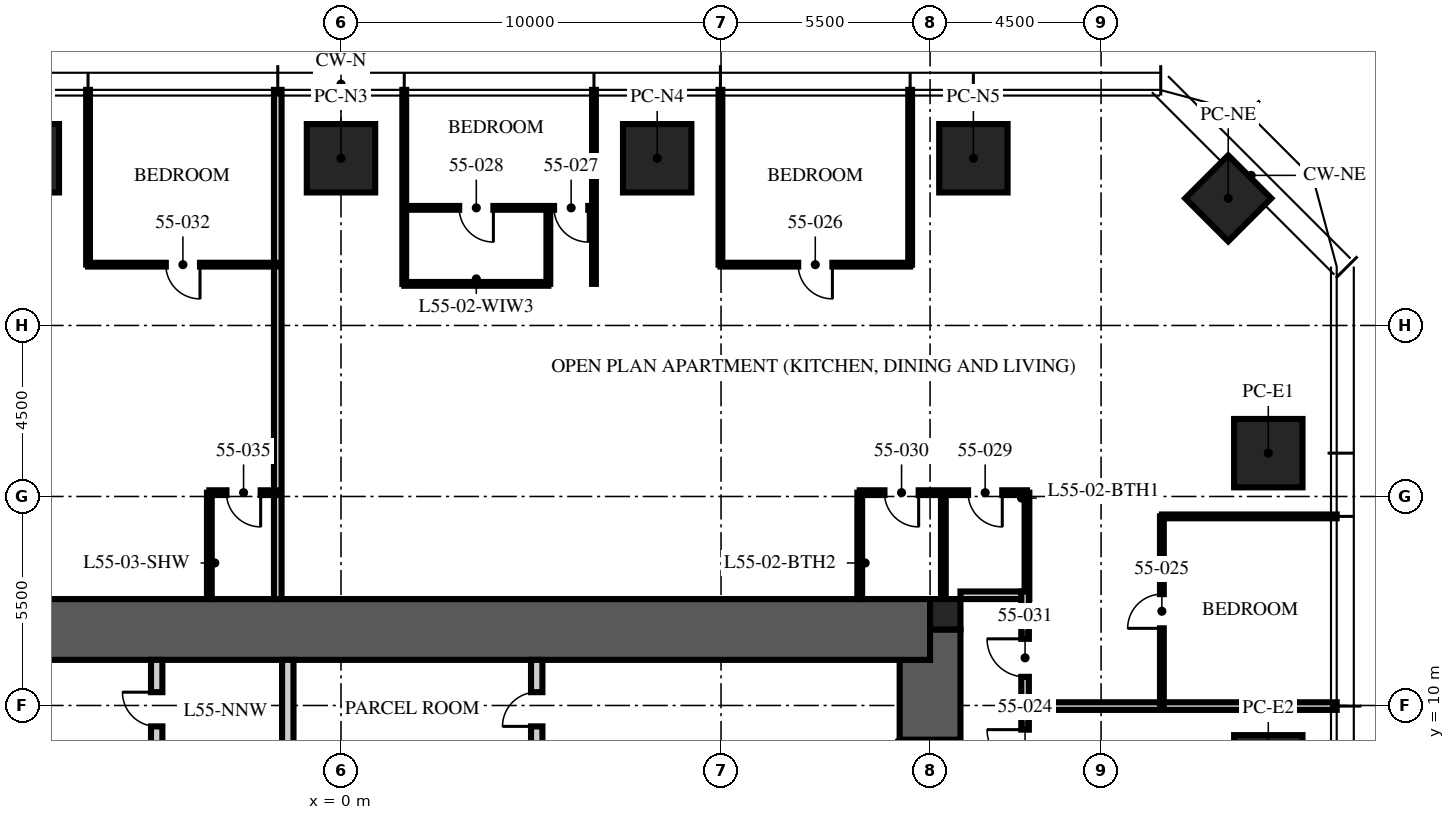
"""IFC4 building model, lengths in metres.
Left out: names, types, materials, properties, quantities, classifications, styles, units other than length and angle.
Written with IfcOpenShell. Run it as: python <this file> out.ifc"""

import sys

from ifc_helpers import new_model, si_unit, direction, frame, frame_2d, origin, origin_2d, place, context, subcontext, project, spatial, rectangle, extrude, element, fill, save


model = new_model("IFC4")
c1 = context("Model", 3, precision=1e-05, world=origin(), true_north=direction((0.0, 1.0)))
c2 = subcontext(c1, "Body", "Model", "MODEL_VIEW")
j1 = project(units=[si_unit("LENGTHUNIT", "METRE"), si_unit("PLANEANGLEUNIT", "RADIAN")], contexts=[c1])
p1 = place(None, origin())
s1 = spatial("IfcSite", under=j1, at=p1, CompositionType="ELEMENT")
p2 = place(p1, origin())
s2 = spatial("IfcBuilding", under=s1, at=p2, CompositionType="ELEMENT")
p3 = place(p2, frame((0.0, 0.0, 222.0)))
s3 = spatial("IfcBuildingStorey", under=s2, at=p3, CompositionType="ELEMENT", Elevation=222.0)
p4 = place(p3, frame((15.5, -12.0, -0.25), z_axis=(0.0, 0.0, 1.0), x_axis=(0.0, 1.0, 0.0)))
e1 = element("IfcWall", 1, at=p4, inside=s3, PredefinedType="SHEAR", context=c2, shape_type="SweptSolid", body=[
    extrude(rectangle(XDim=24.0, YDim=1.6, at=frame_2d((12.0, 0.0))), origin(), (0.0, 0.0, 1.0), 3.75),
])
p5 = place(p4, frame((3.2, 0.0, 0.25)))
e2 = element("IfcOpeningElement", 2, at=p5, cuts=e1, PredefinedType="OPENING", context=c2, shape_type="SweptSolid", body=[
    extrude(rectangle(XDim=1.2, YDim=2.1, at=frame_2d((0.6, 1.05))), frame((0.0, 0.81, 0.0), z_axis=(0.0, -1.0, 0.0), x_axis=(1.0, 0.0, 0.0)), (0.0, 0.0, 1.0), 1.62),
])
p6 = place(p4, frame((19.3, 0.0, 0.25)))
e3 = element("IfcOpeningElement", 3, at=p6, cuts=e1, PredefinedType="OPENING", context=c2, shape_type="SweptSolid", body=[
    extrude(rectangle(XDim=1.8, YDim=2.1, at=frame_2d((0.9, 1.05))), frame((0.0, 0.81, 0.0), z_axis=(0.0, -1.0, 0.0), x_axis=(1.0, 0.0, 0.0)), (0.0, 0.0, 1.0), 1.62),
])
p7 = place(p3, frame((-15.5, 12.0, -0.25), z_axis=(0.0, 0.0, 1.0), x_axis=(1.0, 0.0, 0.0)))
e4 = element("IfcWall", 4, at=p7, inside=s3, PredefinedType="SHEAR", context=c2, shape_type="SweptSolid", body=[
    extrude(rectangle(XDim=31.0, YDim=1.6, at=frame_2d((15.5, 0.0))), origin(), (0.0, 0.0, 1.0), 3.75),
])
p8 = place(p3, frame((15.9, 12.4, -0.25), z_axis=(0.0, 0.0, 1.0), x_axis=(1.0, 0.0, 0.0)))
e5 = element("IfcColumn", 5, at=p8, inside=s3, PredefinedType="COLUMN", context=c2, shape_type="SweptSolid", body=[
    extrude(rectangle(XDim=0.8, YDim=0.8, at=origin_2d()), origin(), (0.0, 0.0, 1.0), 3.75),
])
for number, where, z_axis, x_axis in (
    (6, (-8.32, 24.4, 0.0), (0.0, 0.0, 1.0), (1.0, 0.0, 0.0)),
    (7, (0.0, 24.4, 0.0), (0.0, 0.0, 1.0), (1.0, 0.0, 0.0)),
    (8, (8.32, 24.4, 0.0), (0.0, 0.0, 1.0), (1.0, 0.0, 0.0)),
    (9, (16.64, 24.4, 0.0), (0.0, 0.0, 1.0), (1.0, 0.0, 0.0)),
    (10, (24.4, 16.64, 0.0), (0.0, 0.0, 1.0), (0.0, 1.0, 0.0)),
    (11, (24.4, 8.32, 0.0), (0.0, 0.0, 1.0), (0.0, 1.0, 0.0)),
):
    element("IfcColumn", number, at=place(p3, frame(where, z_axis=z_axis, x_axis=x_axis)), inside=s3, PredefinedType="COLUMN", context=c2, shape_type="SweptSolid", body=[
        extrude(rectangle(XDim=1.8, YDim=1.8, at=origin_2d()), origin(), (0.0, 0.0, 1.0), 3.75),
    ])
p9 = place(p3, frame((23.346, 23.346, 0.0), z_axis=(0.0, 0.0, 1.0), x_axis=(0.707106781187, -0.707106781187, 0.0)))
e12 = element("IfcColumn", 12, at=p9, inside=s3, PredefinedType="COLUMN", context=c2, shape_type="SweptSolid", body=[
    extrude(rectangle(XDim=1.6, YDim=1.6, at=origin_2d()), origin(), (0.0, 0.0, 1.0), 3.75),
])
p10 = place(p3, frame((-4.85, 5.3, 0.0), z_axis=(0.0, 0.0, 1.0), x_axis=(0.0, 1.0, 0.0)))
e13 = element("IfcWall", 13, at=p10, inside=s3, PredefinedType="PARTITIONING", context=c2, shape_type="SweptSolid", body=[
    extrude(rectangle(XDim=5.9, YDim=0.3, at=frame_2d((2.95, 0.0))), origin(), (0.0, 0.0, 1.0), 3.5),
])
p11 = place(p10, frame((4.15, 0.0, 0.0)))
e14 = element("IfcOpeningElement", 14, at=p11, cuts=e13, PredefinedType="OPENING", context=c2, shape_type="SweptSolid", body=[
    extrude(rectangle(XDim=0.9, YDim=2.1, at=frame_2d((0.45, 1.05))), frame((0.0, 0.16, 0.0), z_axis=(0.0, -1.0, 0.0), x_axis=(1.0, 0.0, 0.0)), (0.0, 0.0, 1.0), 0.32),
])
p12 = place(p3, frame((5.15, 5.3, 0.0), z_axis=(0.0, 0.0, 1.0), x_axis=(0.0, 1.0, 0.0)))
e15 = element("IfcWall", 15, at=p12, inside=s3, PredefinedType="PARTITIONING", context=c2, shape_type="SweptSolid", body=[
    extrude(rectangle(XDim=5.9, YDim=0.3, at=frame_2d((2.95, 0.0))), origin(), (0.0, 0.0, 1.0), 3.5),
])
p13 = place(p12, frame((4.15, 0.0, 0.0)))
e16 = element("IfcOpeningElement", 16, at=p13, cuts=e15, PredefinedType="OPENING", context=c2, shape_type="SweptSolid", body=[
    extrude(rectangle(XDim=0.9, YDim=2.1, at=frame_2d((0.45, 1.05))), frame((0.0, 0.16, 0.0), z_axis=(0.0, -1.0, 0.0), x_axis=(1.0, 0.0, 0.0)), (0.0, 0.0, 1.0), 0.32),
])
p14 = place(p3, frame((-1.4, 8.5, 0.0), z_axis=(0.0, 0.0, 1.0), x_axis=(0.0, 1.0, 0.0)))
e17 = element("IfcWall", 17, at=p14, inside=s3, PredefinedType="PARTITIONING", context=c2, shape_type="SweptSolid", body=[
    extrude(rectangle(XDim=2.7, YDim=0.3, at=frame_2d((1.35, 0.0))), origin(), (0.0, 0.0, 1.0), 3.5),
])
p15 = place(p3, frame((16.3, 12.9, 0.0), z_axis=(0.0, 0.0, 1.0), x_axis=(1.0, 0.0, 0.0)))
e18 = element("IfcWall", 18, at=p15, inside=s3, PredefinedType="PARTITIONING", context=c2, shape_type="SweptSolid", body=[
    extrude(rectangle(XDim=1.6, YDim=0.2, at=frame_2d((0.8, 0.0))), origin(), (0.0, 0.0, 1.0), 2.3),
])
p16 = place(p3, frame((18.1, 9.984, 0.0), z_axis=(0.0, 0.0, 1.0), x_axis=(1.0, 0.0, 0.0)))
e19 = element("IfcWall", 19, at=p16, inside=s3, PredefinedType="PARTITIONING", context=c2, shape_type="SweptSolid", body=[
    extrude(rectangle(XDim=8.1, YDim=0.2, at=frame_2d((4.05, 0.0))), origin(), (0.0, 0.0, 1.0), 2.91),
])
for number, where, z_axis, x_axis in (
    (20, (21.6, 14.976, 0.0), (0.0, 0.0, 1.0), (1.0, 0.0, 0.0)),
    (21, (14.976, 21.6, 0.0), (0.0, 0.0, 1.0), (0.0, 1.0, 0.0)),
    (22, (9.984, 21.6, 0.0), (0.0, 0.0, 1.0), (0.0, 1.0, 0.0)),
):
    element("IfcWall", number, at=place(p3, frame(where, z_axis=z_axis, x_axis=x_axis)), inside=s3, PredefinedType="PARTITIONING", context=c2, shape_type="SweptSolid", body=[
        extrude(rectangle(XDim=4.6, YDim=0.1, at=frame_2d((2.3, 0.0))), origin(), (0.0, 0.0, 1.0), 2.91),
    ])
for number, where, z_axis, x_axis in (
    (23, (6.656, 21.095, 0.0), (0.0, 0.0, 1.0), (0.0, 1.0, 0.0)),
    (24, (1.664, 21.095, 0.0), (0.0, 0.0, 1.0), (0.0, 1.0, 0.0)),
):
    element("IfcWall", number, at=place(p3, frame(where, z_axis=z_axis, x_axis=x_axis)), inside=s3, PredefinedType="PARTITIONING", context=c2, shape_type="SweptSolid", body=[
        extrude(rectangle(XDim=5.105, YDim=0.1, at=frame_2d((2.552, 0.0))), origin(), (0.0, 0.0, 1.0), 2.91),
    ])
p17 = place(p3, frame((-1.664, 12.8, 0.0), z_axis=(0.0, 0.0, 1.0), x_axis=(0.0, 1.0, 0.0)))
e25 = element("IfcWall", 25, at=p17, inside=s3, PredefinedType="PARTITIONING", context=c2, shape_type="SweptSolid", body=[
    extrude(rectangle(XDim=13.4, YDim=0.2, at=frame_2d((6.7, 0.0))), origin(), (0.0, 0.0, 1.0), 2.91),
])
p18 = place(p3, frame((-6.656, 21.6, 0.0), z_axis=(0.0, 0.0, 1.0), x_axis=(0.0, 1.0, 0.0)))
e26 = element("IfcWall", 26, at=p18, inside=s3, PredefinedType="PARTITIONING", context=c2, shape_type="SweptSolid", body=[
    extrude(rectangle(XDim=4.6, YDim=0.1, at=frame_2d((2.3, 0.0))), origin(), (0.0, 0.0, 1.0), 2.91),
])
p19 = place(p3, frame((21.6, 9.984, 0.0), z_axis=(0.0, 0.0, 1.0), x_axis=(0.0, 1.0, 0.0)))
e27 = element("IfcWall", 27, at=p19, inside=s3, PredefinedType="PARTITIONING", context=c2, shape_type="SweptSolid", body=[
    extrude(rectangle(XDim=4.992, YDim=0.1, at=frame_2d((2.496, 0.0))), origin(), (0.0, 0.0, 1.0), 2.81),
])
p20 = place(p19, frame((2.046, 0.0, 0.0)))
e28 = element("IfcOpeningElement", 28, at=p20, cuts=e27, PredefinedType="OPENING", context=c2, shape_type="SweptSolid", body=[
    extrude(rectangle(XDim=0.9, YDim=2.1, at=frame_2d((0.45, 1.05))), frame((0.0, 0.06, 0.0), z_axis=(0.0, -1.0, 0.0), x_axis=(1.0, 0.0, 0.0)), (0.0, 0.0, 1.0), 0.12),
])
p21 = place(p3, frame((14.976, 21.6, 0.0), z_axis=(0.0, 0.0, 1.0), x_axis=(-1.0, 0.0, 0.0)))
e29 = element("IfcWall", 29, at=p21, inside=s3, PredefinedType="PARTITIONING", context=c2, shape_type="SweptSolid", body=[
    extrude(rectangle(XDim=4.992, YDim=0.1, at=frame_2d((2.496, 0.0))), origin(), (0.0, 0.0, 1.0), 2.81),
])
p22 = place(p21, frame((2.046, 0.0, 0.0)))
e30 = element("IfcOpeningElement", 30, at=p22, cuts=e29, PredefinedType="OPENING", context=c2, shape_type="SweptSolid", body=[
    extrude(rectangle(XDim=0.9, YDim=2.1, at=frame_2d((0.45, 1.05))), frame((0.0, 0.06, 0.0), z_axis=(0.0, -1.0, 0.0), x_axis=(1.0, 0.0, 0.0)), (0.0, 0.0, 1.0), 0.12),
])
p23 = place(p3, frame((6.656, 23.095, 0.0), z_axis=(0.0, 0.0, 1.0), x_axis=(-1.0, 0.0, 0.0)))
e31 = element("IfcWall", 31, at=p23, inside=s3, PredefinedType="PARTITIONING", context=c2, shape_type="SweptSolid", body=[
    extrude(rectangle(XDim=4.992, YDim=0.1, at=frame_2d((2.496, 0.0))), origin(), (0.0, 0.0, 1.0), 2.81),
])
p24 = place(p23, frame((0.15, 0.0, 0.0)))
e32 = element("IfcOpeningElement", 32, at=p24, cuts=e31, PredefinedType="OPENING", context=c2, shape_type="SweptSolid", body=[
    extrude(rectangle(XDim=0.9, YDim=2.1, at=frame_2d((0.45, 1.05))), frame((0.0, 0.06, 0.0), z_axis=(0.0, -1.0, 0.0), x_axis=(1.0, 0.0, 0.0)), (0.0, 0.0, 1.0), 0.12),
])
p25 = place(p23, frame((2.646, 0.0, 0.0)))
e33 = element("IfcOpeningElement", 33, at=p25, cuts=e31, PredefinedType="OPENING", context=c2, shape_type="SweptSolid", body=[
    extrude(rectangle(XDim=0.9, YDim=2.1, at=frame_2d((0.45, 1.05))), frame((0.0, 0.06, 0.0), z_axis=(0.0, -1.0, 0.0), x_axis=(1.0, 0.0, 0.0)), (0.0, 0.0, 1.0), 0.12),
])
p26 = place(p3, frame((5.456, 21.095, 0.0), z_axis=(0.0, 0.0, 1.0), x_axis=(0.0, 1.0, 0.0)))
e34 = element("IfcWall", 34, at=p26, inside=s3, PredefinedType="PARTITIONING", context=c2, shape_type="SweptSolid", body=[
    extrude(rectangle(XDim=2.0, YDim=0.1, at=frame_2d((1.0, 0.0))), origin(), (0.0, 0.0, 1.0), 3.5),
])
p27 = place(p3, frame((5.456, 21.095, 0.0), z_axis=(0.0, 0.0, 1.0), x_axis=(-1.0, 0.0, 0.0)))
e35 = element("IfcWall", 35, at=p27, inside=s3, PredefinedType="PARTITIONING", context=c2, shape_type="SweptSolid", body=[
    extrude(rectangle(XDim=3.792, YDim=0.1, at=frame_2d((1.896, 0.0))), origin(), (0.0, 0.0, 1.0), 2.81),
])
p28 = place(p3, frame((18.05, 15.6, 0.0), z_axis=(0.0, 0.0, 1.0), x_axis=(-1.0, 0.0, 0.0)))
e36 = element("IfcWall", 36, at=p28, inside=s3, PredefinedType="PARTITIONING", context=c2, shape_type="SweptSolid", body=[
    extrude(rectangle(XDim=4.4, YDim=0.125, at=frame_2d((2.2, 0.0))), origin(), (0.0, 0.0, 1.0), 2.3),
])
p29 = place(p28, frame((0.65, 0.0, 0.0)))
e37 = element("IfcOpeningElement", 37, at=p29, cuts=e36, PredefinedType="OPENING", context=c2, shape_type="SweptSolid", body=[
    extrude(rectangle(XDim=0.9, YDim=2.1, at=frame_2d((0.45, 1.05))), frame((0.0, 0.073, 0.0), z_axis=(0.0, -1.0, 0.0), x_axis=(1.0, 0.0, 0.0)), (0.0, 0.0, 1.0), 0.145),
])
p30 = place(p28, frame((2.85, 0.0, 0.0)))
e38 = element("IfcOpeningElement", 38, at=p30, cuts=e36, PredefinedType="OPENING", context=c2, shape_type="SweptSolid", body=[
    extrude(rectangle(XDim=0.9, YDim=2.1, at=frame_2d((0.45, 1.05))), frame((0.0, 0.073, 0.0), z_axis=(0.0, -1.0, 0.0), x_axis=(1.0, 0.0, 0.0)), (0.0, 0.0, 1.0), 0.145),
])
for number, where, z_axis, x_axis in (
    (39, (18.05, 12.8, 0.0), (0.0, 0.0, 1.0), (0.0, 1.0, 0.0)),
    (40, (15.85, 12.8, 0.0), (0.0, 0.0, 1.0), (0.0, 1.0, 0.0)),
):
    element("IfcWall", number, at=place(p3, frame(where, z_axis=z_axis, x_axis=x_axis)), inside=s3, PredefinedType="PARTITIONING", context=c2, shape_type="SweptSolid", body=[
        extrude(rectangle(XDim=2.8, YDim=0.125, at=frame_2d((1.4, 0.0))), origin(), (0.0, 0.0, 1.0), 2.3),
    ])
p31 = place(p3, frame((13.65, 12.8, 0.0), z_axis=(0.0, 0.0, 1.0), x_axis=(0.0, 1.0, 0.0)))
e41 = element("IfcWall", 41, at=p31, inside=s3, PredefinedType="PARTITIONING", context=c2, shape_type="SweptSolid", body=[
    extrude(rectangle(XDim=2.8, YDim=0.125, at=frame_2d((1.4, 0.0))), origin(), (0.0, 0.0, 1.0), 3.5),
])
p32 = place(p3, frame((-1.664, 21.6, 0.0), z_axis=(0.0, 0.0, 1.0), x_axis=(-1.0, 0.0, 0.0)))
e42 = element("IfcWall", 42, at=p32, inside=s3, PredefinedType="PARTITIONING", context=c2, shape_type="SweptSolid", body=[
    extrude(rectangle(XDim=4.992, YDim=0.1, at=frame_2d((2.496, 0.0))), origin(), (0.0, 0.0, 1.0), 2.81),
])
p33 = place(p32, frame((2.046, 0.0, 0.0)))
e43 = element("IfcOpeningElement", 43, at=p33, cuts=e42, PredefinedType="OPENING", context=c2, shape_type="SweptSolid", body=[
    extrude(rectangle(XDim=0.9, YDim=2.1, at=frame_2d((0.45, 1.05))), frame((0.0, 0.06, 0.0), z_axis=(0.0, -1.0, 0.0), x_axis=(1.0, 0.0, 0.0)), (0.0, 0.0, 1.0), 0.12),
])
p34 = place(p3, frame((-1.664, 15.6, 0.0), z_axis=(0.0, 0.0, 1.0), x_axis=(-1.0, 0.0, 0.0)))
e44 = element("IfcWall", 44, at=p34, inside=s3, PredefinedType="PARTITIONING", context=c2, shape_type="SweptSolid", body=[
    extrude(rectangle(XDim=1.8, YDim=0.125, at=frame_2d((0.9, 0.0))), origin(), (0.0, 0.0, 1.0), 3.5),
])
p35 = place(p34, frame((0.45, 0.0, 0.0)))
e45 = element("IfcOpeningElement", 45, at=p35, cuts=e44, PredefinedType="OPENING", context=c2, shape_type="SweptSolid", body=[
    extrude(rectangle(XDim=0.9, YDim=2.1, at=frame_2d((0.45, 1.05))), frame((0.0, 0.073, 0.0), z_axis=(0.0, -1.0, 0.0), x_axis=(1.0, 0.0, 0.0)), (0.0, 0.0, 1.0), 0.145),
])
p36 = place(p3, frame((-3.464, 12.8, 0.0), z_axis=(0.0, 0.0, 1.0), x_axis=(0.0, 1.0, 0.0)))
e46 = element("IfcWall", 46, at=p36, inside=s3, PredefinedType="PARTITIONING", context=c2, shape_type="SweptSolid", body=[
    extrude(rectangle(XDim=2.8, YDim=0.125, at=frame_2d((1.4, 0.0))), origin(), (0.0, 0.0, 1.0), 3.5),
])
p37 = place(p3, frame((18.0, -12.8, 0.0), z_axis=(0.0, 0.0, 1.0), x_axis=(0.0, 1.0, 0.0)))
e47 = element("IfcWall", 47, at=p37, inside=s3, PredefinedType="PARTITIONING", context=c2, shape_type="SweptSolid", body=[
    extrude(rectangle(XDim=25.8, YDim=0.2, at=frame_2d((12.9, 0.0))), origin(), (0.0, 0.0, 1.0), 2.6),
])
p38 = place(p37, frame((21.164, 0.0, 0.0)))
e48 = element("IfcOpeningElement", 48, at=p38, cuts=e47, PredefinedType="OPENING", context=c2, shape_type="SweptSolid", body=[
    extrude(rectangle(XDim=1.0, YDim=2.2, at=frame_2d((0.5, 1.1))), frame((0.0, 0.11, 0.0), z_axis=(0.0, -1.0, 0.0), x_axis=(1.0, 0.0, 0.0)), (0.0, 0.0, 1.0), 0.22),
])
p39 = place(p37, frame((23.554, 0.0, 0.0)))
e49 = element("IfcOpeningElement", 49, at=p39, cuts=e47, PredefinedType="OPENING", context=c2, shape_type="SweptSolid", body=[
    extrude(rectangle(XDim=1.0, YDim=2.2, at=frame_2d((0.5, 1.1))), frame((0.0, 0.11, 0.0), z_axis=(0.0, -1.0, 0.0), x_axis=(1.0, 0.0, 0.0)), (0.0, 0.0, 1.0), 0.22),
])
p40 = place(p37, frame((4.4, 0.0, 0.0)))
e50 = element("IfcOpeningElement", 50, at=p40, cuts=e47, PredefinedType="OPENING", context=c2, shape_type="SweptSolid", body=[
    extrude(rectangle(XDim=1.0, YDim=2.2, at=frame_2d((0.5, 1.1))), frame((0.0, 0.11, 0.0), z_axis=(0.0, -1.0, 0.0), x_axis=(1.0, 0.0, 0.0)), (0.0, 0.0, 1.0), 0.22),
])
p41 = place(p6, origin())
e51 = element("IfcDoor", 51, at=p41, inside=s3, OperationType="DOUBLE_DOOR_SINGLE_SWING", PredefinedType="DOOR", context=c2, shape_type="SweptSolid", body=[
    extrude(rectangle(XDim=1.8, YDim=2.1, at=frame_2d((0.9, 1.05))), frame((0.0, 0.025, 0.0), z_axis=(0.0, -1.0, 0.0), x_axis=(1.0, 0.0, 0.0)), (0.0, 0.0, 1.0), 0.05),
])
fill(e3, e51)
p42 = place(p11, origin())
e52 = element("IfcDoor", 52, at=p42, inside=s3, OperationType="SINGLE_SWING_RIGHT", PredefinedType="DOOR", context=c2, shape_type="SweptSolid", body=[
    extrude(rectangle(XDim=0.9, YDim=2.1, at=frame_2d((0.45, 1.05))), frame((0.0, 0.025, 0.0), z_axis=(0.0, -1.0, 0.0), x_axis=(1.0, 0.0, 0.0)), (0.0, 0.0, 1.0), 0.05),
])
fill(e14, e52)
p43 = place(p13, origin())
e53 = element("IfcDoor", 53, at=p43, inside=s3, OperationType="SINGLE_SWING_LEFT", PredefinedType="DOOR", context=c2, shape_type="SweptSolid", body=[
    extrude(rectangle(XDim=0.9, YDim=2.1, at=frame_2d((0.45, 1.05))), frame((0.0, 0.025, 0.0), z_axis=(0.0, -1.0, 0.0), x_axis=(1.0, 0.0, 0.0)), (0.0, 0.0, 1.0), 0.05),
])
fill(e16, e53)
p44 = place(p38, origin())
e54 = element("IfcDoor", 54, at=p44, inside=s3, OperationType="SINGLE_SWING_RIGHT", PredefinedType="DOOR", context=c2, shape_type="SweptSolid", body=[
    extrude(rectangle(XDim=1.0, YDim=2.2, at=frame_2d((0.5, 1.1))), frame((0.0, 0.025, 0.0), z_axis=(0.0, -1.0, 0.0), x_axis=(1.0, 0.0, 0.0)), (0.0, 0.0, 1.0), 0.05),
])
fill(e48, e54)
p45 = place(p20, origin())
e55 = element("IfcDoor", 55, at=p45, inside=s3, OperationType="SINGLE_SWING_LEFT", PredefinedType="DOOR", context=c2, shape_type="SweptSolid", body=[
    extrude(rectangle(XDim=0.9, YDim=2.1, at=frame_2d((0.45, 1.05))), frame((0.0, 0.025, 0.0), z_axis=(0.0, -1.0, 0.0), x_axis=(1.0, 0.0, 0.0)), (0.0, 0.0, 1.0), 0.05),
])
fill(e28, e55)
p46 = place(p22, origin())
e56 = element("IfcDoor", 56, at=p46, inside=s3, OperationType="SINGLE_SWING_LEFT", PredefinedType="DOOR", context=c2, shape_type="SweptSolid", body=[
    extrude(rectangle(XDim=0.9, YDim=2.1, at=frame_2d((0.45, 1.05))), frame((0.0, 0.025, 0.0), z_axis=(0.0, -1.0, 0.0), x_axis=(1.0, 0.0, 0.0)), (0.0, 0.0, 1.0), 0.05),
])
fill(e30, e56)
p47 = place(p24, origin())
e57 = element("IfcDoor", 57, at=p47, inside=s3, OperationType="SINGLE_SWING_LEFT", PredefinedType="DOOR", context=c2, shape_type="SweptSolid", body=[
    extrude(rectangle(XDim=0.9, YDim=2.1, at=frame_2d((0.45, 1.05))), frame((0.0, 0.025, 0.0), z_axis=(0.0, -1.0, 0.0), x_axis=(1.0, 0.0, 0.0)), (0.0, 0.0, 1.0), 0.05),
])
fill(e32, e57)
p48 = place(p25, origin())
e58 = element("IfcDoor", 58, at=p48, inside=s3, OperationType="SINGLE_SWING_LEFT", PredefinedType="DOOR", context=c2, shape_type="SweptSolid", body=[
    extrude(rectangle(XDim=0.9, YDim=2.1, at=frame_2d((0.45, 1.05))), frame((0.0, 0.025, 0.0), z_axis=(0.0, -1.0, 0.0), x_axis=(1.0, 0.0, 0.0)), (0.0, 0.0, 1.0), 0.05),
])
fill(e33, e58)
p49 = place(p29, origin())
e59 = element("IfcDoor", 59, at=p49, inside=s3, OperationType="SINGLE_SWING_LEFT", PredefinedType="DOOR", context=c2, shape_type="SweptSolid", body=[
    extrude(rectangle(XDim=0.9, YDim=2.1, at=frame_2d((0.45, 1.05))), frame((0.0, 0.025, 0.0), z_axis=(0.0, -1.0, 0.0), x_axis=(1.0, 0.0, 0.0)), (0.0, 0.0, 1.0), 0.05),
])
fill(e37, e59)
p50 = place(p30, origin())
e60 = element("IfcDoor", 60, at=p50, inside=s3, OperationType="SINGLE_SWING_LEFT", PredefinedType="DOOR", context=c2, shape_type="SweptSolid", body=[
    extrude(rectangle(XDim=0.9, YDim=2.1, at=frame_2d((0.45, 1.05))), frame((0.0, 0.025, 0.0), z_axis=(0.0, -1.0, 0.0), x_axis=(1.0, 0.0, 0.0)), (0.0, 0.0, 1.0), 0.05),
])
fill(e38, e60)
p51 = place(p39, origin())
e61 = element("IfcDoor", 61, at=p51, inside=s3, OperationType="SINGLE_SWING_RIGHT", PredefinedType="DOOR", context=c2, shape_type="SweptSolid", body=[
    extrude(rectangle(XDim=1.0, YDim=2.2, at=frame_2d((0.5, 1.1))), frame((0.0, 0.025, 0.0), z_axis=(0.0, -1.0, 0.0), x_axis=(1.0, 0.0, 0.0)), (0.0, 0.0, 1.0), 0.05),
])
fill(e49, e61)
p52 = place(p33, origin())
e62 = element("IfcDoor", 62, at=p52, inside=s3, OperationType="SINGLE_SWING_LEFT", PredefinedType="DOOR", context=c2, shape_type="SweptSolid", body=[
    extrude(rectangle(XDim=0.9, YDim=2.1, at=frame_2d((0.45, 1.05))), frame((0.0, 0.025, 0.0), z_axis=(0.0, -1.0, 0.0), x_axis=(1.0, 0.0, 0.0)), (0.0, 0.0, 1.0), 0.05),
])
fill(e43, e62)
p53 = place(p35, origin())
e63 = element("IfcDoor", 63, at=p53, inside=s3, OperationType="SINGLE_SWING_LEFT", PredefinedType="DOOR", context=c2, shape_type="SweptSolid", body=[
    extrude(rectangle(XDim=0.9, YDim=2.1, at=frame_2d((0.45, 1.05))), frame((0.0, 0.025, 0.0), z_axis=(0.0, -1.0, 0.0), x_axis=(1.0, 0.0, 0.0)), (0.0, 0.0, 1.0), 0.05),
])
fill(e45, e63)
save(model, sys.argv[1])
